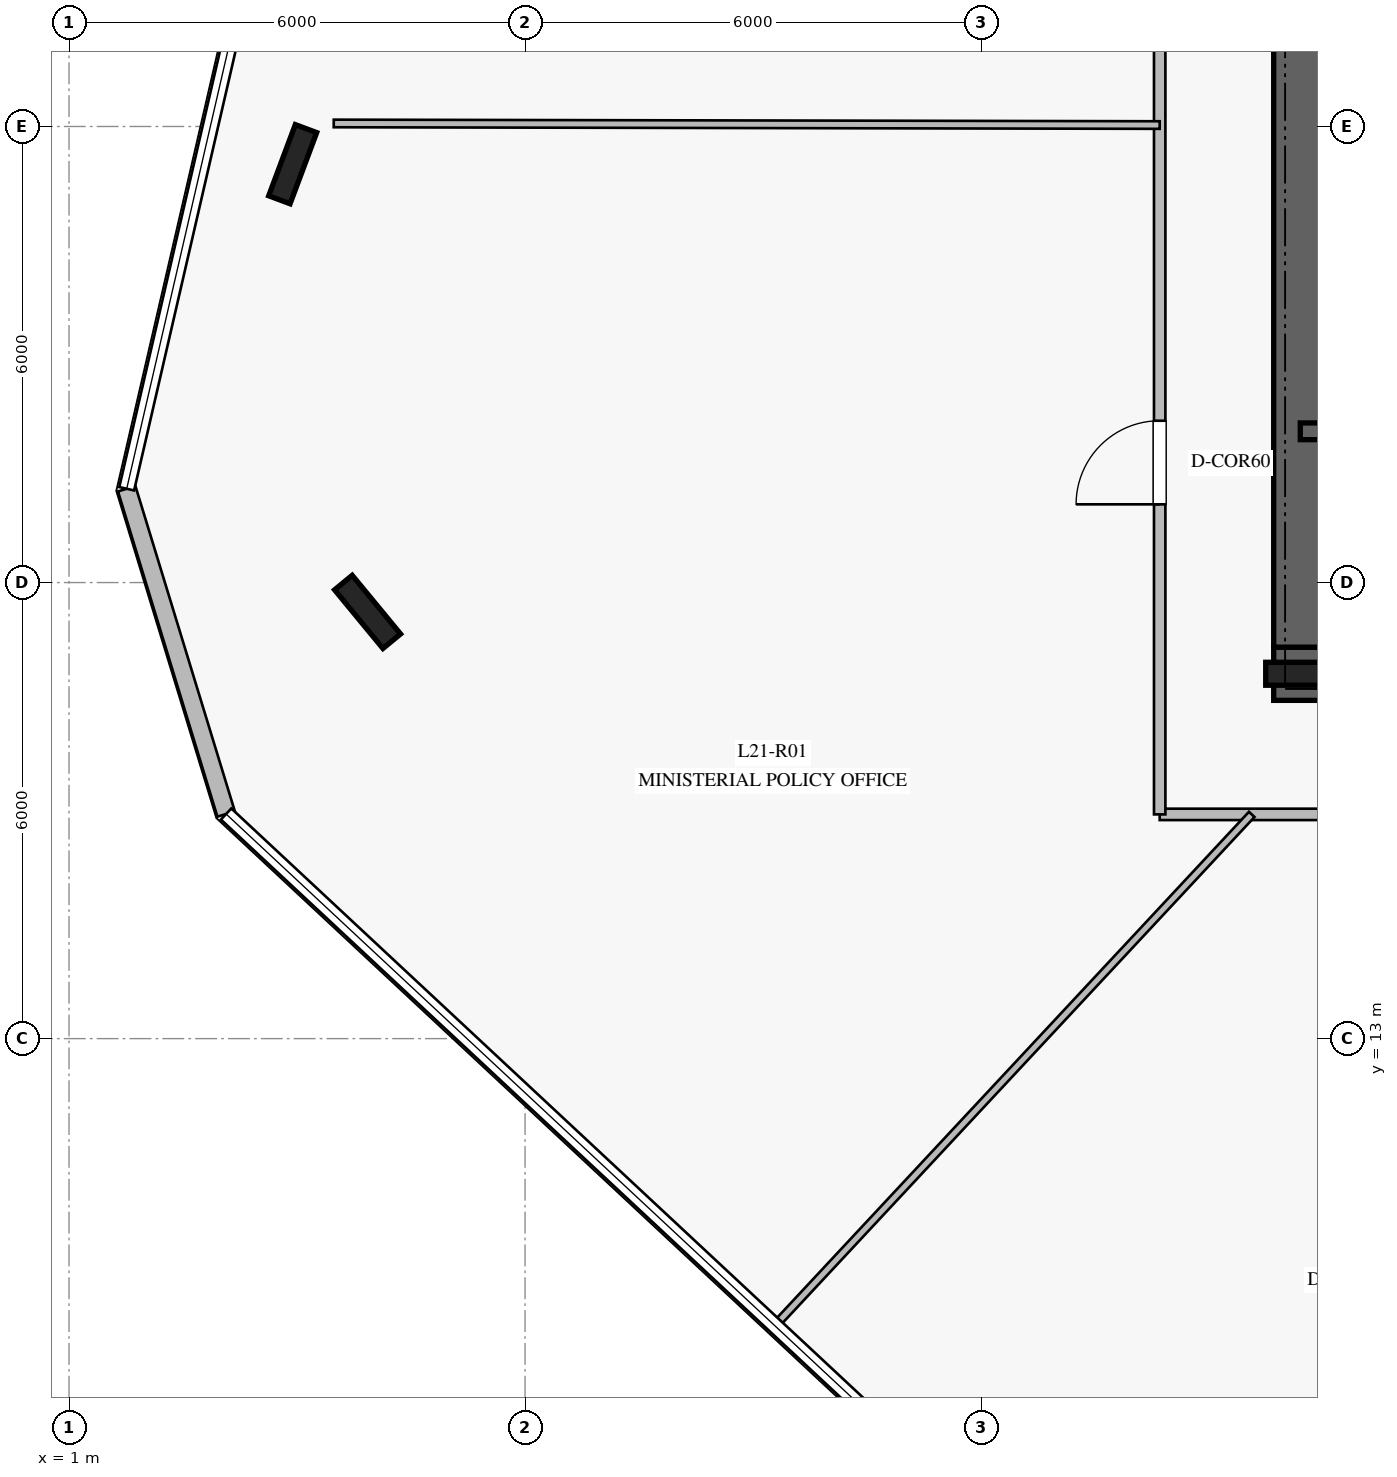
"""IFC4 building model, lengths in metres.
Left out: names, types, materials, properties, quantities, classifications, styles, units other than length and angle.
Written with IfcOpenShell. Run it as: python <this file> out.ifc"""

import sys

from ifc_helpers import new_model, si_unit, direction, frame, frame_2d, origin, origin_2d, place, context, subcontext, project, spatial, rectangle, i_section, extrude, element, fill, save


model = new_model("IFC4")
c1 = context("Model", 3, precision=1e-05, world=origin(), true_north=direction((0.0, 1.0)))
c2 = subcontext(c1, "Body", "Model", "MODEL_VIEW")
j1 = project(units=[si_unit("LENGTHUNIT", "METRE"), si_unit("PLANEANGLEUNIT", "RADIAN")], contexts=[c1])
p1 = place(None, origin())
s1 = spatial("IfcSite", under=j1, at=p1, CompositionType="ELEMENT")
p2 = place(p1, origin())
s2 = spatial("IfcBuilding", under=s1, at=p2, CompositionType="ELEMENT")
p3 = place(p2, frame((0.0, 0.0, 88.0)))
s3 = spatial("IfcBuildingStorey", under=s2, at=p3, CompositionType="ELEMENT", Elevation=88.0)
p4 = place(p3, frame((16.85, 17.8, 0.0), z_axis=(0.0, 0.0, 1.0), x_axis=(1.0, 0.0, 0.0)))
e1 = element("IfcWall", 1, at=p4, inside=s3, PredefinedType="SHEAR", context=c2, shape_type="SweptSolid", body=[
    extrude(rectangle(XDim=16.3, YDim=0.7, at=frame_2d((8.15, 0.0))), origin(), (0.0, 0.0, 1.0), 3.7),
])
p5 = place(p4, frame((5.1, 0.0, 0.0)))
e2 = element("IfcOpeningElement", 2, at=p5, cuts=e1, PredefinedType="OPENING", context=c2, shape_type="SweptSolid", body=[
    extrude(rectangle(XDim=1.2, YDim=2.25, at=frame_2d((0.6, 1.125))), frame((0.0, 0.36, 0.0), z_axis=(0.0, -1.0, 0.0), x_axis=(1.0, 0.0, 0.0)), (0.0, 0.0, 1.0), 0.72),
])
p6 = place(p4, frame((14.05, 0.0, 0.0)))
e3 = element("IfcOpeningElement", 3, at=p6, cuts=e1, PredefinedType="OPENING", context=c2, shape_type="SweptSolid", body=[
    extrude(rectangle(XDim=0.9, YDim=2.1, at=frame_2d((0.45, 1.05))), frame((0.0, 0.36, 0.0), z_axis=(0.0, -1.0, 0.0), x_axis=(1.0, 0.0, 0.0)), (0.0, 0.0, 1.0), 0.72),
])
p7 = place(p4, frame((7.95, 0.0, 0.0)))
e4 = element("IfcOpeningElement", 4, at=p7, cuts=e1, PredefinedType="OPENING", context=c2, shape_type="SweptSolid", body=[
    extrude(rectangle(XDim=1.1, YDim=2.2, at=frame_2d((0.55, 1.1))), frame((0.0, 0.36, 0.0), z_axis=(0.0, -1.0, 0.0), x_axis=(1.0, 0.0, 0.0)), (0.0, 0.0, 1.0), 0.72),
])
p8 = place(p4, frame((9.925, 0.0, 0.0)))
e5 = element("IfcOpeningElement", 5, at=p8, cuts=e1, PredefinedType="OPENING", context=c2, shape_type="SweptSolid", body=[
    extrude(rectangle(XDim=1.1, YDim=2.2, at=frame_2d((0.55, 1.1))), frame((0.0, 0.36, 0.0), z_axis=(0.0, -1.0, 0.0), x_axis=(1.0, 0.0, 0.0)), (0.0, 0.0, 1.0), 0.72),
])
p9 = place(p4, frame((11.9, 0.0, 0.0)))
e6 = element("IfcOpeningElement", 6, at=p9, cuts=e1, PredefinedType="OPENING", context=c2, shape_type="SweptSolid", body=[
    extrude(rectangle(XDim=1.1, YDim=2.2, at=frame_2d((0.55, 1.1))), frame((0.0, 0.36, 0.0), z_axis=(0.0, -1.0, 0.0), x_axis=(1.0, 0.0, 0.0)), (0.0, 0.0, 1.0), 0.72),
])
p10 = place(p3, frame((17.2, 31.85, 0.0), z_axis=(0.0, 0.0, 1.0), x_axis=(0.0, -1.0, 0.0)))
e7 = element("IfcWall", 7, at=p10, inside=s3, PredefinedType="SHEAR", context=c2, shape_type="SweptSolid", body=[
    extrude(rectangle(XDim=13.7, YDim=0.7, at=frame_2d((6.85, 0.0))), origin(), (0.0, 0.0, 1.0), 3.7),
])
p11 = place(p10, frame((2.0, 0.0, 0.0)))
e8 = element("IfcOpeningElement", 8, at=p11, cuts=e7, PredefinedType="OPENING", context=c2, shape_type="SweptSolid", body=[
    extrude(rectangle(XDim=1.5, YDim=2.2, at=frame_2d((0.75, 1.1))), frame((0.0, 0.36, 0.0), z_axis=(0.0, -1.0, 0.0), x_axis=(1.0, 0.0, 0.0)), (0.0, 0.0, 1.0), 0.72),
])
p12 = place(p3, frame((17.2, 17.8, 0.0), z_axis=(0.0, 0.0, 1.0), x_axis=(1.0, 0.0, 0.0)))
e9 = element("IfcColumn", 9, at=p12, inside=s3, PredefinedType="COLUMN", context=c2, shape_type="SweptSolid", body=[
    extrude(i_section(OverallWidth=0.302, OverallDepth=0.91, WebThickness=0.021, FlangeThickness=0.04, at=origin_2d()), origin(), (0.0, 0.0, 1.0), 4.0),
])
p13 = place(p3, frame((17.2, 20.99, 0.0), z_axis=(0.0, 0.0, 1.0), x_axis=(1.0, 0.0, 0.0)))
e10 = element("IfcWall", 10, at=p13, inside=s3, PredefinedType="SOLIDWALL", context=c2, shape_type="SweptSolid", body=[
    extrude(rectangle(XDim=3.72, YDim=0.22, at=frame_2d((1.86, 0.0))), origin(), (0.0, 0.0, 1.0), 3.7),
])
for number, where, z_axis, x_axis in (
    (11, (3.943, 24.504, 0.0), (0.0, 0.0, 1.0), (0.35, 0.937, 0.0)),
    (12, (4.928, 18.614, 0.0), (0.0, 0.0, 1.0), (-0.636, 0.772, 0.0)),
):
    element("IfcColumn", number, at=place(p3, frame(where, z_axis=z_axis, x_axis=x_axis)), inside=s3, PredefinedType="COLUMN", context=c2, shape_type="SweptSolid", body=[
        extrude(i_section(OverallWidth=0.3, OverallDepth=1.0, WebThickness=0.019, FlangeThickness=0.036, at=origin_2d()), origin(), (0.0, 0.0, 1.0), 4.0),
    ])
p14 = place(p3, frame((1.759, 20.234, 0.0), z_axis=(0.0, 0.0, 1.0), x_axis=(0.292310029535, -0.956323609786, 0.0)))
e13 = element("IfcWall", 13, at=p14, inside=s3, PredefinedType="STANDARD", context=c2, shape_type="SweptSolid", body=[
    extrude(rectangle(XDim=4.474, YDim=0.24, at=frame_2d((2.237, 0.0))), origin(), (0.0, 0.0, 1.0), 3.7),
])
p15 = place(p3, frame((34.65, 15.95, 0.0), z_axis=(0.0, 0.0, 1.0), x_axis=(-1.0, 0.0, 0.0)))
e14 = element("IfcWall", 14, at=p15, inside=s3, PredefinedType="PARTITIONING", context=c2, shape_type="SweptSolid", body=[
    extrude(rectangle(XDim=19.3, YDim=0.15, at=frame_2d((9.65, 0.0))), origin(), (0.0, 0.0, 1.0), 3.15),
])
p16 = place(p15, frame((12.608, 0.0, 0.0)))
e15 = element("IfcOpeningElement", 15, at=p16, cuts=e14, PredefinedType="OPENING", context=c2, shape_type="SweptSolid", body=[
    extrude(rectangle(XDim=1.1, YDim=2.2, at=frame_2d((0.55, 1.1))), frame((0.0, 0.085, 0.0), z_axis=(0.0, -1.0, 0.0), x_axis=(1.0, 0.0, 0.0)), (0.0, 0.0, 1.0), 0.17),
])
p17 = place(p3, frame((15.35, 15.95, 0.0), z_axis=(0.0, 0.0, 1.0), x_axis=(0.0, 1.0, 0.0)))
e16 = element("IfcWall", 16, at=p17, inside=s3, PredefinedType="PARTITIONING", context=c2, shape_type="SweptSolid", body=[
    extrude(rectangle(XDim=18.1, YDim=0.15, at=frame_2d((9.05, 0.0))), origin(), (0.0, 0.0, 1.0), 3.15),
])
p18 = place(p17, frame((4.079, 0.0, 0.0)))
e17 = element("IfcOpeningElement", 17, at=p18, cuts=e16, PredefinedType="OPENING", context=c2, shape_type="SweptSolid", body=[
    extrude(rectangle(XDim=1.1, YDim=2.2, at=frame_2d((0.55, 1.1))), frame((0.0, 0.085, 0.0), z_axis=(0.0, -1.0, 0.0), x_axis=(1.0, 0.0, 0.0)), (0.0, 0.0, 1.0), 0.17),
])
p19 = place(p17, frame((12.762, 0.0, 0.0)))
e18 = element("IfcOpeningElement", 18, at=p19, cuts=e16, PredefinedType="OPENING", context=c2, shape_type="SweptSolid", body=[
    extrude(rectangle(XDim=1.1, YDim=2.2, at=frame_2d((0.55, 1.1))), frame((0.0, 0.085, 0.0), z_axis=(0.0, -1.0, 0.0), x_axis=(1.0, 0.0, 0.0)), (0.0, 0.0, 1.0), 0.17),
])
p20 = place(p3, frame((15.35, 25.019, 0.0), z_axis=(0.0, 0.0, 1.0), x_axis=(-0.999998133571, 0.001932059658, 0.0)))
e19 = element("IfcWall", 19, at=p20, inside=s3, PredefinedType="MOVABLE", context=c2, shape_type="SweptSolid", body=[
    extrude(rectangle(XDim=10.867, YDim=0.1, at=frame_2d((5.434, 0.0))), origin(), (0.0, 0.0, 1.0), 3.7),
])
p21 = place(p3, frame((16.561, 15.95, 0.0), z_axis=(0.0, 0.0, 1.0), x_axis=(-0.682067130349, -0.731289566244, 0.0)))
e20 = element("IfcWall", 20, at=p21, inside=s3, PredefinedType="MOVABLE", context=c2, shape_type="SweptSolid", body=[
    extrude(rectangle(XDim=9.181, YDim=0.1, at=frame_2d((4.59, 0.0))), origin(), (0.0, 0.0, 1.0), 3.0),
])
p22 = place(p18, origin())
e21 = element("IfcDoor", 21, at=p22, inside=s3, OperationType="SINGLE_SWING_LEFT", PredefinedType="DOOR", context=c2, shape_type="SweptSolid", body=[
    extrude(rectangle(XDim=1.1, YDim=2.2, at=frame_2d((0.55, 1.1))), frame((0.0, 0.025, 0.0), z_axis=(0.0, -1.0, 0.0), x_axis=(1.0, 0.0, 0.0)), (0.0, 0.0, 1.0), 0.05),
])
fill(e17, e21)
save(model, sys.argv[1])
